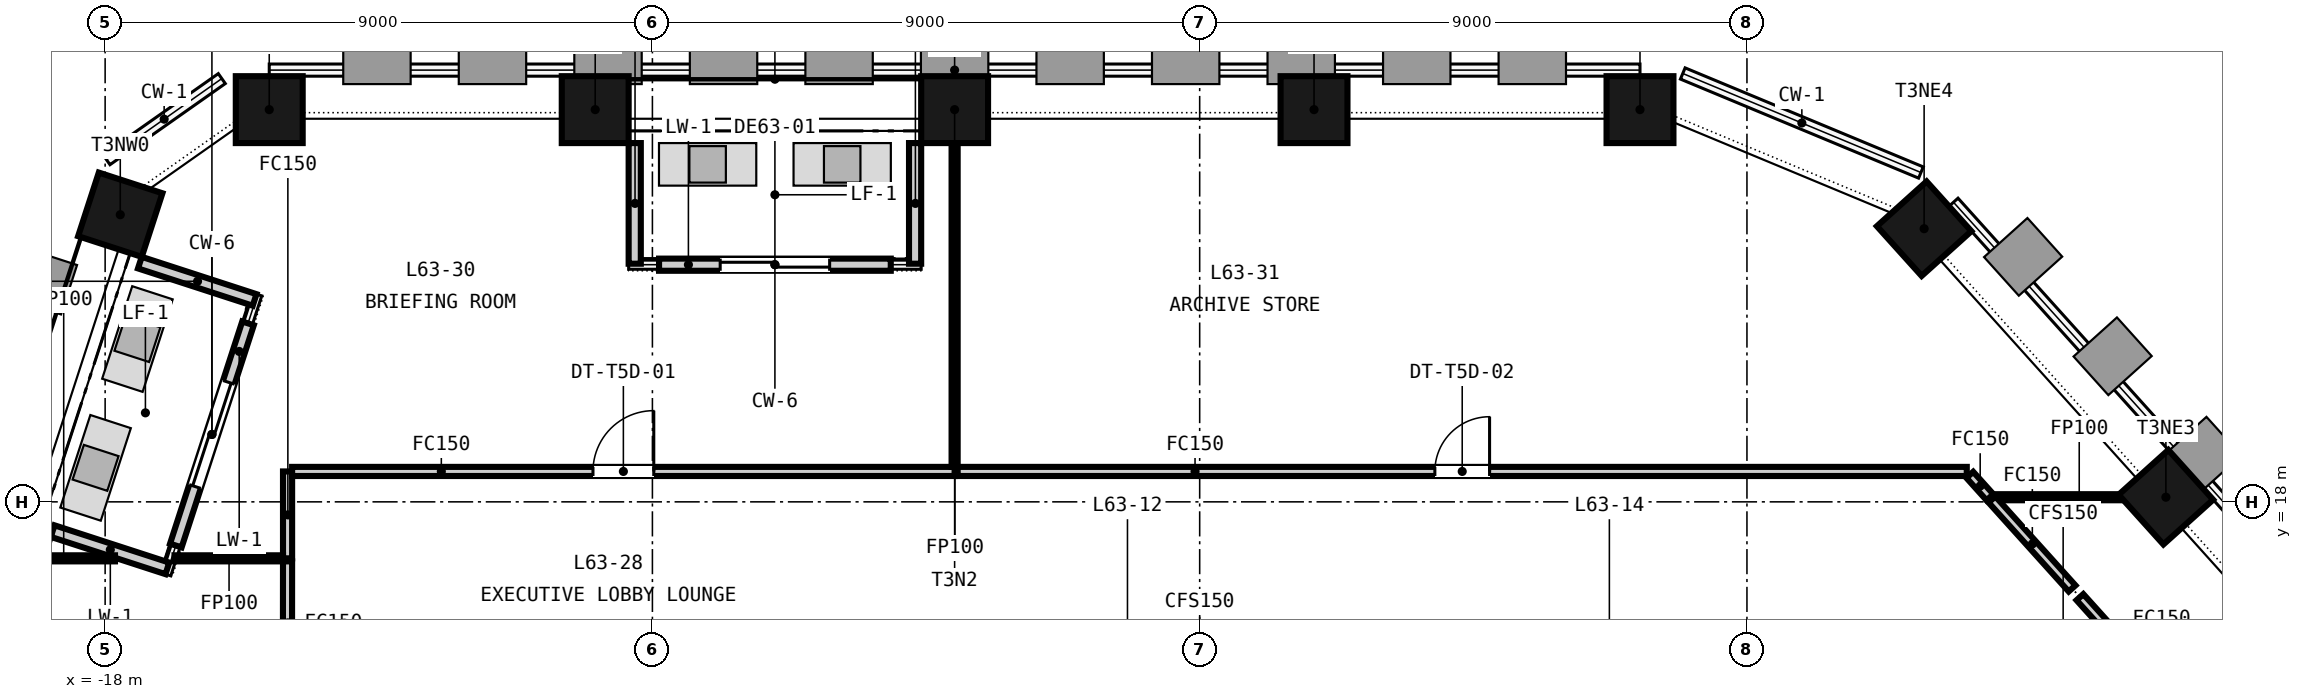
"""IFC4 building model, lengths in metres.
Left out: names, types, materials, properties, quantities, classifications, styles, units other than length and angle.
Written with IfcOpenShell. Run it as: python <this file> out.ifc"""

import sys

from ifc_helpers import new_model, si_unit, direction, frame, frame_2d, origin, origin_2d, place, context, subcontext, project, spatial, rectangle, extrude, element, fill, save


model = new_model("IFC4")
c1 = context("Model", 3, precision=1e-05, world=origin(), true_north=direction((0.0, 1.0)))
c2 = subcontext(c1, "Body", "Model", "MODEL_VIEW")
j1 = project(units=[si_unit("LENGTHUNIT", "METRE"), si_unit("PLANEANGLEUNIT", "RADIAN")], contexts=[c1])
p1 = place(None, origin())
s1 = spatial("IfcSite", under=j1, at=p1, CompositionType="ELEMENT")
p2 = place(p1, origin())
s2 = spatial("IfcBuilding", under=s1, at=p2, CompositionType="ELEMENT")
p3 = place(p2, frame((0.0, 0.0, 249.15)))
s3 = spatial("IfcBuildingStorey", under=s2, at=p3, CompositionType="ELEMENT", Elevation=249.15)
for number, where, z_axis, x_axis in (
    (1, (7.241, 24.45, -0.15), (0.0, 0.0, 1.0), (-1.0, 0.0, 0.0)),
    (2, (1.881, 24.45, -0.15), (0.0, 0.0, 1.0), (-1.0, 0.0, 0.0)),
    (3, (-4.03, 24.45, -0.15), (0.0, 0.0, 1.0), (-1.0, 0.0, 0.0)),
    (4, (-9.941, 24.45, -0.15), (0.0, 0.0, 1.0), (-1.0, 0.0, 0.0)),
    (5, (-15.301, 24.45, -0.15), (0.0, 0.0, 1.0), (-1.0, 0.0, 0.0)),
    (6, (-17.751, 22.722, -0.15), (0.0, 0.0, 1.0), (-0.309, -0.951, 0.0)),
    (7, (15.89, 18.076, -0.15), (0.0, 0.0, 1.0), (-0.669, 0.743, 0.0)),
    (8, (11.914, 22.492, -0.15), (0.0, 0.0, 1.0), (-0.669, 0.743, 0.0)),
):
    element("IfcColumn", number, at=place(p3, frame(where, z_axis=z_axis, x_axis=x_axis)), inside=s3, PredefinedType="COLUMN", context=c2, shape_type="SweptSolid", body=[
        extrude(rectangle(XDim=1.1, YDim=1.1, at=origin_2d()), origin(), (0.0, 0.0, 1.0), 3.65),
    ])
p4 = place(p3, frame((-5.08, 21.9, 0.0), z_axis=(0.0, 0.0, 1.0), x_axis=(-1.0, 0.0, 0.0)))
e9 = element("IfcWall", 9, at=p4, inside=s3, PredefinedType="SOLIDWALL", context=c2, shape_type="SweptSolid", body=[
    extrude(rectangle(XDim=3.811, YDim=0.2, at=frame_2d((1.905, 0.0))), origin(), (0.0, 0.0, 1.0), 2.897),
])
p5 = place(p4, frame((1.005, 0.0, 0.0)))
e10 = element("IfcOpeningElement", 10, at=p5, cuts=e9, PredefinedType="OPENING", context=c2, shape_type="SweptSolid", body=[
    extrude(rectangle(XDim=1.8, YDim=2.4, at=frame_2d((0.9, 1.2))), frame((0.0, 0.11, 0.0), z_axis=(0.0, -1.0, 0.0), x_axis=(1.0, 0.0, 0.0)), (0.0, 0.0, 1.0), 0.22),
])
for number, where, z_axis, x_axis in (
    (11, (-4.68, 23.9, 0.0), (0.0, 0.0, 1.0), (0.0, -1.0, 0.0)),
    (12, (-9.291, 23.9, 0.0), (0.0, 0.0, 1.0), (0.0, -1.0, 0.0)),
):
    element("IfcWall", number, at=place(p3, frame(where, z_axis=z_axis, x_axis=x_axis)), inside=s3, PredefinedType="SOLIDWALL", context=c2, shape_type="SweptSolid", body=[
        extrude(rectangle(XDim=1.984, YDim=0.2, at=frame_2d((0.992, 0.0))), origin(), (0.0, 0.0, 1.0), 3.05),
    ])
p6 = place(p3, frame((-15.65, 20.935, 0.0), z_axis=(0.0, 0.0, 1.0), x_axis=(-0.308973988745, -0.951070488596, 0.0)))
e13 = element("IfcWall", 13, at=p6, inside=s3, PredefinedType="SOLIDWALL", context=c2, shape_type="SweptSolid", body=[
    extrude(rectangle(XDim=3.842, YDim=0.2, at=frame_2d((1.921, 0.0))), origin(), (0.0, 0.0, 1.0), 3.05),
])
p7 = place(p6, frame((1.021, 0.0, 0.0)))
e14 = element("IfcOpeningElement", 14, at=p7, cuts=e13, PredefinedType="OPENING", context=c2, shape_type="SweptSolid", body=[
    extrude(rectangle(XDim=1.8, YDim=2.4, at=frame_2d((0.9, 1.2))), frame((0.0, 0.11, 0.0), z_axis=(0.0, -1.0, 0.0), x_axis=(1.0, 0.0, 0.0)), (0.0, 0.0, 1.0), 0.22),
])
p8 = place(p3, frame((-17.429, 21.934, 0.0), z_axis=(0.0, 0.0, 1.0), x_axis=(0.951019598045, -0.309130593981, 0.0)))
e15 = element("IfcWall", 15, at=p8, inside=s3, PredefinedType="SOLIDWALL", context=c2, shape_type="SweptSolid", body=[
    extrude(rectangle(XDim=1.984, YDim=0.2, at=frame_2d((0.992, 0.0))), origin(), (0.0, 0.0, 1.0), 2.9),
])
p9 = place(p3, frame((-18.863, 17.519, 0.0), z_axis=(0.0, 0.0, 1.0), x_axis=(0.951067521568, -0.308983121576, 0.0)))
e16 = element("IfcWall", 16, at=p9, inside=s3, PredefinedType="SOLIDWALL", context=c2, shape_type="SweptSolid", body=[
    extrude(rectangle(XDim=1.984, YDim=0.2, at=frame_2d((0.992, 0.0))), origin(), (0.0, 0.0, 1.0), 2.9),
])
p10 = place(p3, frame((-15.0, 17.071, 0.0), z_axis=(0.0, 0.0, 1.0), x_axis=(0.0, 1.0, 0.0)))
e17 = element("IfcWall", 17, at=p10, inside=s3, PredefinedType="PARTITIONING", context=c2, shape_type="SweptSolid", body=[
    extrude(rectangle(XDim=1.429, YDim=0.15, at=frame_2d((0.714, 0.0))), origin(), (0.0, 0.0, 1.0), 2.751),
])
p11 = place(p3, frame((-14.925, 18.5, 0.0), z_axis=(0.0, 0.0, 1.0), x_axis=(1.0, 0.0, 0.0)))
e18 = element("IfcWall", 18, at=p11, inside=s3, PredefinedType="PARTITIONING", context=c2, shape_type="SweptSolid", body=[
    extrude(rectangle(XDim=10.895, YDim=0.15, at=frame_2d((5.448, 0.0))), origin(), (0.0, 0.0, 1.0), 2.751),
])
p12 = place(p11, frame((4.948, 0.0, 0.0)))
e19 = element("IfcOpeningElement", 19, at=p12, cuts=e18, PredefinedType="OPENING", context=c2, shape_type="SweptSolid", body=[
    extrude(rectangle(XDim=1.0, YDim=2.1, at=frame_2d((0.5, 1.05))), frame((0.0, 0.085, 0.0), z_axis=(0.0, -1.0, 0.0), x_axis=(1.0, 0.0, 0.0)), (0.0, 0.0, 1.0), 0.17),
])
p13 = place(p3, frame((-4.03, 18.575, 0.0), z_axis=(0.0, 0.0, 1.0), x_axis=(0.0, 1.0, 0.0)))
e20 = element("IfcWall", 20, at=p13, inside=s3, PredefinedType="PARTITIONING", context=c2, shape_type="SweptSolid", body=[
    extrude(rectangle(XDim=5.825, YDim=0.1, at=frame_2d((2.913, 0.0))), origin(), (0.0, 0.0, 1.0), 2.751),
])
p14 = place(p3, frame((-19.535, 17.071, 0.0), z_axis=(0.0, 0.0, 1.0), x_axis=(1.0, 0.0, 0.0)))
e21 = element("IfcWall", 21, at=p14, inside=s3, PredefinedType="PARTITIONING", context=c2, shape_type="SweptSolid", body=[
    extrude(rectangle(XDim=1.697, YDim=0.1, at=frame_2d((0.849, 0.0))), origin(), (0.0, 0.0, 1.0), 2.751),
])
p15 = place(p3, frame((-16.859, 17.071, 0.0), z_axis=(0.0, 0.0, 1.0), x_axis=(1.0, 0.0, 0.0)))
e22 = element("IfcWall", 22, at=p15, inside=s3, PredefinedType="PARTITIONING", context=c2, shape_type="SweptSolid", body=[
    extrude(rectangle(XDim=1.784, YDim=0.1, at=frame_2d((0.892, 0.0))), origin(), (0.0, 0.0, 1.0), 2.751),
])
p16 = place(p3, frame((-3.98, 18.5, 0.0), z_axis=(0.0, 0.0, 1.0), x_axis=(1.0, 0.0, 0.0)))
e23 = element("IfcWall", 23, at=p16, inside=s3, PredefinedType="PARTITIONING", context=c2, shape_type="SweptSolid", body=[
    extrude(rectangle(XDim=16.595, YDim=0.15, at=frame_2d((8.297, 0.0))), origin(), (0.0, 0.0, 1.0), 2.751),
])
p17 = place(p16, frame((7.847, 0.0, 0.0)))
e24 = element("IfcOpeningElement", 24, at=p17, cuts=e23, PredefinedType="OPENING", context=c2, shape_type="SweptSolid", body=[
    extrude(rectangle(XDim=0.9, YDim=2.1, at=frame_2d((0.45, 1.05))), frame((0.0, 0.085, 0.0), z_axis=(0.0, -1.0, 0.0), x_axis=(1.0, 0.0, 0.0)), (0.0, 0.0, 1.0), 0.17),
])
p18 = place(p3, frame((12.665, 18.444, 0.0), z_axis=(0.0, 0.0, 1.0), x_axis=(0.668637752652, -0.743588297197, 0.0)))
e25 = element("IfcWall", 25, at=p18, inside=s3, PredefinedType="PARTITIONING", context=c2, shape_type="SweptSolid", body=[
    extrude(rectangle(XDim=0.495, YDim=0.15, at=frame_2d((0.248, 0.0))), origin(), (0.0, 0.0, 1.0), 2.751),
])
p19 = place(p3, frame((13.097, 18.076, 0.0), z_axis=(0.0, 0.0, 1.0), x_axis=(1.0, 0.0, 0.0)))
e26 = element("IfcWall", 26, at=p19, inside=s3, PredefinedType="PARTITIONING", context=c2, shape_type="SweptSolid", body=[
    extrude(rectangle(XDim=2.725, YDim=0.1, at=frame_2d((1.363, 0.0))), origin(), (0.0, 0.0, 1.0), 2.751),
])
p20 = place(p3, frame((-15.002, 14.998, 0.0), z_axis=(0.0, 0.0, 1.0), x_axis=(0.000965483499, 0.999999533921, 0.0)))
e27 = element("IfcWall", 27, at=p20, inside=s3, PredefinedType="PARTITIONING", context=c2, shape_type="SweptSolid", body=[
    extrude(rectangle(XDim=2.023, YDim=0.15, at=frame_2d((1.011, 0.0))), origin(), (0.0, 0.0, 1.0), 2.751),
])
p21 = place(p3, frame((13.03, 18.039, 0.0), z_axis=(0.0, 0.0, 1.0), x_axis=(0.669183955235, -0.743096786466, 0.0)))
e28 = element("IfcWall", 28, at=p21, inside=s3, PredefinedType="PARTITIONING", context=c2, shape_type="SweptSolid", body=[
    extrude(rectangle(XDim=1.969, YDim=0.15, at=frame_2d((0.984, 0.0))), origin(), (0.0, 0.0, 1.0), 2.751),
])
p22 = place(p3, frame((14.476, 16.433, 0.0), z_axis=(0.0, 0.0, 1.0), x_axis=(0.669204384193, -0.743078388985, 0.0)))
e29 = element("IfcWall", 29, at=p22, inside=s3, PredefinedType="PARTITIONING", context=c2, shape_type="SweptSolid", body=[
    extrude(rectangle(XDim=3.996, YDim=0.15, at=frame_2d((1.998, 0.0))), origin(), (0.0, 0.0, 1.0), 2.751),
])
p23 = place(p5, origin())
e30 = element("IfcDoor", 30, at=p23, inside=s3, OperationType="SINGLE_SWING_LEFT", PredefinedType="DOOR", context=c2, shape_type="SweptSolid", body=[
    extrude(rectangle(XDim=1.8, YDim=2.4, at=frame_2d((0.9, 1.2))), frame((0.0, 0.025, 0.0), z_axis=(0.0, -1.0, 0.0), x_axis=(1.0, 0.0, 0.0)), (0.0, 0.0, 1.0), 0.05),
])
fill(e10, e30)
p24 = place(p7, origin())
e31 = element("IfcDoor", 31, at=p24, inside=s3, OperationType="SINGLE_SWING_LEFT", PredefinedType="DOOR", context=c2, shape_type="SweptSolid", body=[
    extrude(rectangle(XDim=1.8, YDim=2.4, at=frame_2d((0.9, 1.2))), frame((0.0, 0.025, 0.0), z_axis=(0.0, -1.0, 0.0), x_axis=(1.0, 0.0, 0.0)), (0.0, 0.0, 1.0), 0.05),
])
fill(e14, e31)
p25 = place(p12, origin())
e32 = element("IfcDoor", 32, at=p25, inside=s3, OperationType="SINGLE_SWING_RIGHT", PredefinedType="DOOR", context=c2, shape_type="SweptSolid", body=[
    extrude(rectangle(XDim=1.0, YDim=2.1, at=frame_2d((0.5, 1.05))), frame((0.0, 0.025, 0.0), z_axis=(0.0, -1.0, 0.0), x_axis=(1.0, 0.0, 0.0)), (0.0, 0.0, 1.0), 0.05),
])
fill(e19, e32)
p26 = place(p17, origin())
e33 = element("IfcDoor", 33, at=p26, inside=s3, OperationType="SINGLE_SWING_RIGHT", PredefinedType="DOOR", context=c2, shape_type="SweptSolid", body=[
    extrude(rectangle(XDim=0.9, YDim=2.1, at=frame_2d((0.45, 1.05))), frame((0.0, 0.025, 0.0), z_axis=(0.0, -1.0, 0.0), x_axis=(1.0, 0.0, 0.0)), (0.0, 0.0, 1.0), 0.05),
])
fill(e24, e33)
save(model, sys.argv[1])
